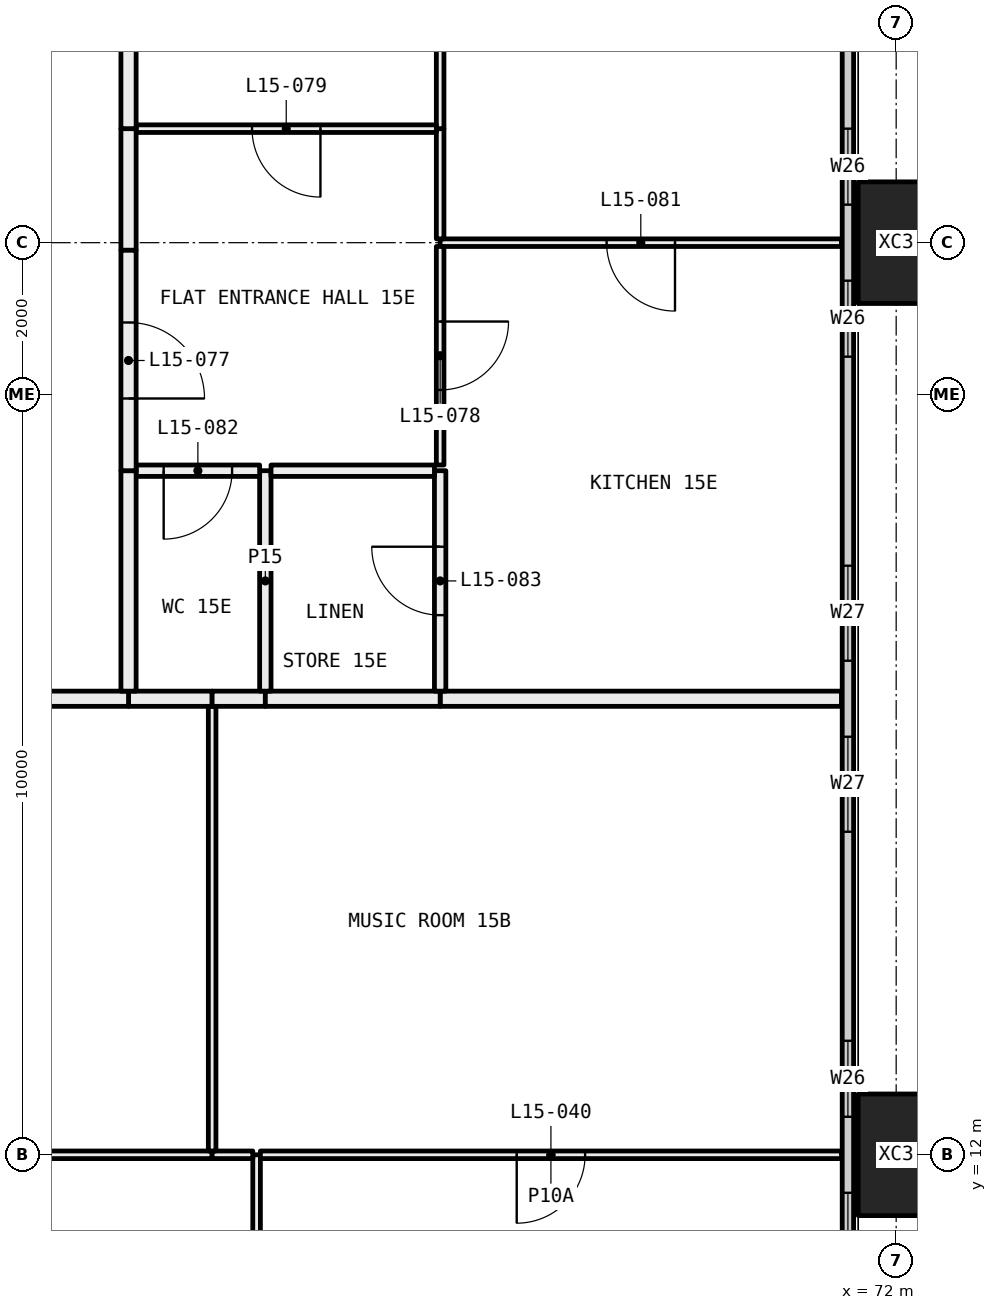
"""IFC4 building model, lengths in metres.
Left out: names, types, materials, properties, quantities, classifications, styles, units other than length and angle.
Written with IfcOpenShell. Run it as: python <this file> out.ifc"""

import sys

from ifc_helpers import new_model, si_unit, direction, frame, frame_2d, origin, origin_2d, place, context, subcontext, project, spatial, rectangle, hollow_rectangle, extrude, element, fill, save


model = new_model("IFC4")
c1 = context("Model", 3, precision=1e-05, world=origin(), true_north=direction((0.0, 1.0)))
c2 = subcontext(c1, "Body", "Model", "MODEL_VIEW")
j1 = project(units=[si_unit("LENGTHUNIT", "METRE"), si_unit("PLANEANGLEUNIT", "RADIAN")], contexts=[c1])
p1 = place(None, origin())
s1 = spatial("IfcSite", under=j1, at=p1, CompositionType="ELEMENT")
p2 = place(p1, origin())
s2 = spatial("IfcBuilding", under=s1, at=p2, CompositionType="ELEMENT")
p3 = place(p2, frame((0.0, 0.0, 64.5)))
s3 = spatial("IfcBuildingStorey", under=s2, at=p3, CompositionType="ELEMENT", Elevation=64.5)
for number, where, z_axis, x_axis in (
    (1, (72.0, 12.0, -0.4), (0.0, 0.0, 1.0), (0.0, 1.0, 0.0)),
    (2, (72.0, 24.0, -0.4), (0.0, 0.0, 1.0), (0.0, 1.0, 0.0)),
):
    element("IfcColumn", number, at=place(p3, frame(where, z_axis=z_axis, x_axis=x_axis)), inside=s3, PredefinedType="COLUMN", context=c2, shape_type="SweptSolid", body=[
        extrude(hollow_rectangle(XDim=1.6, YDim=1.0, WallThickness=0.065, at=origin_2d()), origin(), (0.0, 0.0, 1.0), 3.45),
    ])
p4 = place(p3, frame((71.365, 6.71, 0.0), z_axis=(0.0, 0.0, 1.0), x_axis=(0.0, 1.0, 0.0)))
e3 = element("IfcWall", 3, at=p4, inside=s3, PredefinedType="ELEMENTEDWALL", context=c2, shape_type="SweptSolid", body=[
    extrude(rectangle(XDim=34.58, YDim=0.15, at=frame_2d((17.29, 0.0))), origin(), (0.0, 0.0, 1.0), 3.05),
])
p5 = place(p4, frame((0.29, 0.0, 0.45)))
e4 = element("IfcOpeningElement", 4, at=p5, cuts=e3, PredefinedType="OPENING", context=c2, shape_type="SweptSolid", body=[
    extrude(rectangle(XDim=4.5, YDim=2.55, at=frame_2d((2.25, 1.275))), frame((0.0, 0.085, 0.0), z_axis=(0.0, -1.0, 0.0), x_axis=(1.0, 0.0, 0.0)), (0.0, 0.0, 1.0), 0.17),
])
p6 = place(p4, frame((5.79, 0.0, 0.45)))
e5 = element("IfcOpeningElement", 5, at=p6, cuts=e3, PredefinedType="OPENING", context=c2, shape_type="SweptSolid", body=[
    extrude(rectangle(XDim=1.0, YDim=2.55, at=frame_2d((0.5, 1.275))), frame((0.0, 0.085, 0.0), z_axis=(0.0, -1.0, 0.0), x_axis=(1.0, 0.0, 0.0)), (0.0, 0.0, 1.0), 0.17),
])
p7 = place(p4, frame((9.54, 0.0, 0.45)))
e6 = element("IfcOpeningElement", 6, at=p7, cuts=e3, PredefinedType="OPENING", context=c2, shape_type="SweptSolid", body=[
    extrude(rectangle(XDim=1.25, YDim=2.55, at=frame_2d((0.625, 1.275))), frame((0.0, 0.085, 0.0), z_axis=(0.0, -1.0, 0.0), x_axis=(1.0, 0.0, 0.0)), (0.0, 0.0, 1.0), 0.17),
])
p8 = place(p4, frame((11.79, 0.0, 0.45)))
e7 = element("IfcOpeningElement", 7, at=p8, cuts=e3, PredefinedType="OPENING", context=c2, shape_type="SweptSolid", body=[
    extrude(rectangle(XDim=1.25, YDim=2.55, at=frame_2d((0.625, 1.275))), frame((0.0, 0.085, 0.0), z_axis=(0.0, -1.0, 0.0), x_axis=(1.0, 0.0, 0.0)), (0.0, 0.0, 1.0), 0.17),
])
p9 = place(p4, frame((15.79, 0.0, 0.45)))
e8 = element("IfcOpeningElement", 8, at=p9, cuts=e3, PredefinedType="OPENING", context=c2, shape_type="SweptSolid", body=[
    extrude(rectangle(XDim=1.0, YDim=2.55, at=frame_2d((0.5, 1.275))), frame((0.0, 0.085, 0.0), z_axis=(0.0, -1.0, 0.0), x_axis=(1.0, 0.0, 0.0)), (0.0, 0.0, 1.0), 0.17),
])
p10 = place(p4, frame((17.79, 0.0, 0.45)))
e9 = element("IfcOpeningElement", 9, at=p10, cuts=e3, PredefinedType="OPENING", context=c2, shape_type="SweptSolid", body=[
    extrude(rectangle(XDim=1.0, YDim=2.55, at=frame_2d((0.5, 1.275))), frame((0.0, 0.085, 0.0), z_axis=(0.0, -1.0, 0.0), x_axis=(1.0, 0.0, 0.0)), (0.0, 0.0, 1.0), 0.17),
])
p11 = place(p4, frame((21.54, 0.0, 0.45)))
e10 = element("IfcOpeningElement", 10, at=p11, cuts=e3, PredefinedType="OPENING", context=c2, shape_type="SweptSolid", body=[
    extrude(rectangle(XDim=1.25, YDim=2.55, at=frame_2d((0.625, 1.275))), frame((0.0, 0.085, 0.0), z_axis=(0.0, -1.0, 0.0), x_axis=(1.0, 0.0, 0.0)), (0.0, 0.0, 1.0), 0.17),
])
p12 = place(p4, frame((23.79, 0.0, 0.45)))
e11 = element("IfcOpeningElement", 11, at=p12, cuts=e3, PredefinedType="OPENING", context=c2, shape_type="SweptSolid", body=[
    extrude(rectangle(XDim=1.25, YDim=2.55, at=frame_2d((0.625, 1.275))), frame((0.0, 0.085, 0.0), z_axis=(0.0, -1.0, 0.0), x_axis=(1.0, 0.0, 0.0)), (0.0, 0.0, 1.0), 0.17),
])
p13 = place(p4, frame((27.79, 0.0, 0.45)))
e12 = element("IfcOpeningElement", 12, at=p13, cuts=e3, PredefinedType="OPENING", context=c2, shape_type="SweptSolid", body=[
    extrude(rectangle(XDim=1.0, YDim=2.55, at=frame_2d((0.5, 1.275))), frame((0.0, 0.085, 0.0), z_axis=(0.0, -1.0, 0.0), x_axis=(1.0, 0.0, 0.0)), (0.0, 0.0, 1.0), 0.17),
])
p14 = place(p4, frame((29.79, 0.0, 0.45)))
e13 = element("IfcOpeningElement", 13, at=p14, cuts=e3, PredefinedType="OPENING", context=c2, shape_type="SweptSolid", body=[
    extrude(rectangle(XDim=4.5, YDim=2.55, at=frame_2d((2.25, 1.275))), frame((0.0, 0.085, 0.0), z_axis=(0.0, -1.0, 0.0), x_axis=(1.0, 0.0, 0.0)), (0.0, 0.0, 1.0), 0.17),
])
p15 = place(p3, frame((63.585, 6.05, 0.0), z_axis=(0.0, 0.0, 1.0), x_axis=(0.0, 1.0, 0.0)))
e14 = element("IfcWall", 14, at=p15, inside=s3, PredefinedType="PARTITIONING", context=c2, shape_type="SweptSolid", body=[
    extrude(rectangle(XDim=5.95, YDim=0.1, at=frame_2d((2.975, 0.0))), origin(), (0.0, 0.0, 1.0), 2.45),
])
p16 = place(p15, frame((2.525, 0.0, 0.0)))
e15 = element("IfcOpeningElement", 15, at=p16, cuts=e14, PredefinedType="OPENING", context=c2, shape_type="SweptSolid", body=[
    extrude(rectangle(XDim=0.9, YDim=2.1, at=frame_2d((0.45, 1.05))), frame((0.0, 0.06, 0.0), z_axis=(0.0, -1.0, 0.0), x_axis=(1.0, 0.0, 0.0)), (0.0, 0.0, 1.0), 0.12),
])
p17 = place(p3, frame((63.0, 12.0, 0.0), z_axis=(0.0, 0.0, 1.0), x_axis=(-1.0, 0.0, 0.0)))
e16 = element("IfcWall", 16, at=p17, inside=s3, PredefinedType="PARTITIONING", context=c2, shape_type="SweptSolid", body=[
    extrude(rectangle(XDim=2.2, YDim=0.1, at=frame_2d((1.1, 0.0))), origin(), (0.0, 0.0, 1.0), 2.45),
])
p18 = place(p3, frame((63.535, 12.0, 0.0), z_axis=(0.0, 0.0, 1.0), x_axis=(-1.0, 0.0, 0.0)))
e17 = element("IfcWall", 17, at=p18, inside=s3, PredefinedType="PARTITIONING", context=c2, shape_type="SweptSolid", body=[
    extrude(rectangle(XDim=0.535, YDim=0.1, at=frame_2d((0.268, 0.0))), origin(), (0.0, 0.0, 1.0), 2.45),
])
p19 = place(p3, frame((71.28, 12.0, 0.0), z_axis=(0.0, 0.0, 1.0), x_axis=(-1.0, 0.0, 0.0)))
e18 = element("IfcWall", 18, at=p19, inside=s3, PredefinedType="PARTITIONING", context=c2, shape_type="SweptSolid", body=[
    extrude(rectangle(XDim=7.645, YDim=0.1, at=frame_2d((3.823, 0.0))), origin(), (0.0, 0.0, 1.0), 2.45),
])
p20 = place(p19, frame((3.373, 0.0, 0.0)))
e19 = element("IfcOpeningElement", 19, at=p20, cuts=e18, PredefinedType="OPENING", context=c2, shape_type="SweptSolid", body=[
    extrude(rectangle(XDim=0.9, YDim=2.1, at=frame_2d((0.45, 1.05))), frame((0.0, 0.06, 0.0), z_axis=(0.0, -1.0, 0.0), x_axis=(1.0, 0.0, 0.0)), (0.0, 0.0, 1.0), 0.12),
])
p21 = place(p3, frame((63.0, 12.05, 0.0), z_axis=(0.0, 0.0, 1.0), x_axis=(0.0, 1.0, 0.0)))
e20 = element("IfcWall", 20, at=p21, inside=s3, PredefinedType="PARTITIONING", context=c2, shape_type="SweptSolid", body=[
    extrude(rectangle(XDim=5.85, YDim=0.1, at=frame_2d((2.925, 0.0))), origin(), (0.0, 0.0, 1.0), 2.45),
])
p22 = place(p3, frame((63.0, 18.0, 0.0), z_axis=(0.0, 0.0, 1.0), x_axis=(-1.0, 0.0, 0.0)))
e21 = element("IfcWall", 21, at=p22, inside=s3, PredefinedType="PARTITIONING", context=c2, shape_type="SweptSolid", body=[
    extrude(rectangle(XDim=1.1, YDim=0.2, at=frame_2d((0.55, 0.0))), origin(), (0.0, 0.0, 1.0), 3.05),
])
p23 = place(p3, frame((61.9, 18.0, 0.0), z_axis=(0.0, 0.0, 1.0), x_axis=(-1.0, 0.0, 0.0)))
e22 = element("IfcWall", 22, at=p23, inside=s3, PredefinedType="PARTITIONING", context=c2, shape_type="SweptSolid", body=[
    extrude(rectangle(XDim=7.9, YDim=0.2, at=frame_2d((3.95, 0.0))), origin(), (0.0, 0.0, 1.0), 3.05),
])
p24 = place(p3, frame((71.28, 18.0, 0.0), z_axis=(0.0, 0.0, 1.0), x_axis=(-1.0, 0.0, 0.0)))
e23 = element("IfcWall", 23, at=p24, inside=s3, PredefinedType="PARTITIONING", context=c2, shape_type="SweptSolid", body=[
    extrude(rectangle(XDim=5.28, YDim=0.2, at=frame_2d((2.64, 0.0))), origin(), (0.0, 0.0, 1.0), 3.05),
])
p25 = place(p3, frame((63.7, 18.0, 0.0), z_axis=(0.0, 0.0, 1.0), x_axis=(-1.0, 0.0, 0.0)))
e24 = element("IfcWall", 24, at=p25, inside=s3, PredefinedType="PARTITIONING", context=c2, shape_type="SweptSolid", body=[
    extrude(rectangle(XDim=0.7, YDim=0.2, at=frame_2d((0.35, 0.0))), origin(), (0.0, 0.0, 1.0), 3.05),
])
p26 = place(p3, frame((66.0, 18.0, 0.0), z_axis=(0.0, 0.0, 1.0), x_axis=(-1.0, 0.0, 0.0)))
e25 = element("IfcWall", 25, at=p26, inside=s3, PredefinedType="PARTITIONING", context=c2, shape_type="SweptSolid", body=[
    extrude(rectangle(XDim=2.3, YDim=0.2, at=frame_2d((1.15, 0.0))), origin(), (0.0, 0.0, 1.0), 3.05),
])
p27 = place(p3, frame((71.28, 24.0, 0.0), z_axis=(0.0, 0.0, 1.0), x_axis=(-1.0, 0.0, 0.0)))
e26 = element("IfcWall", 26, at=p27, inside=s3, PredefinedType="PARTITIONING", context=c2, shape_type="SweptSolid", body=[
    extrude(rectangle(XDim=5.28, YDim=0.1, at=frame_2d((2.64, 0.0))), origin(), (0.0, 0.0, 1.0), 2.45),
])
p28 = place(p27, frame((2.19, 0.0, 0.0)))
e27 = element("IfcOpeningElement", 27, at=p28, cuts=e26, PredefinedType="OPENING", context=c2, shape_type="SweptSolid", body=[
    extrude(rectangle(XDim=0.9, YDim=2.1, at=frame_2d((0.45, 1.05))), frame((0.0, 0.06, 0.0), z_axis=(0.0, -1.0, 0.0), x_axis=(1.0, 0.0, 0.0)), (0.0, 0.0, 1.0), 0.12),
])
p29 = place(p3, frame((66.0, 21.0, 0.0), z_axis=(0.0, 0.0, 1.0), x_axis=(0.0, -1.0, 0.0)))
e28 = element("IfcWall", 28, at=p29, inside=s3, PredefinedType="PARTITIONING", context=c2, shape_type="SweptSolid", body=[
    extrude(rectangle(XDim=2.9, YDim=0.15, at=frame_2d((1.45, 0.0))), origin(), (0.0, 0.0, 1.0), 3.05),
])
p30 = place(p29, frame((1.0, 0.0, 0.0)))
e29 = element("IfcOpeningElement", 29, at=p30, cuts=e28, PredefinedType="OPENING", context=c2, shape_type="SweptSolid", body=[
    extrude(rectangle(XDim=0.9, YDim=2.1, at=frame_2d((0.45, 1.05))), frame((0.0, 0.085, 0.0), z_axis=(0.0, -1.0, 0.0), x_axis=(1.0, 0.0, 0.0)), (0.0, 0.0, 1.0), 0.17),
])
p31 = place(p3, frame((66.0, 23.95, 0.0), z_axis=(0.0, 0.0, 1.0), x_axis=(0.0, -1.0, 0.0)))
e30 = element("IfcWall", 30, at=p31, inside=s3, PredefinedType="PARTITIONING", context=c2, shape_type="SweptSolid", body=[
    extrude(rectangle(XDim=2.875, YDim=0.1, at=frame_2d((1.438, 0.0))), origin(), (0.0, 0.0, 1.0), 2.45),
])
p32 = place(p31, frame((0.988, 0.0, 0.0)))
e31 = element("IfcOpeningElement", 31, at=p32, cuts=e30, PredefinedType="OPENING", context=c2, shape_type="SweptSolid", body=[
    extrude(rectangle(XDim=0.9, YDim=2.1, at=frame_2d((0.45, 1.05))), frame((0.0, 0.06, 0.0), z_axis=(0.0, -1.0, 0.0), x_axis=(1.0, 0.0, 0.0)), (0.0, 0.0, 1.0), 0.12),
])
p33 = place(p3, frame((66.0, 25.5, 0.0), z_axis=(0.0, 0.0, 1.0), x_axis=(0.0, -1.0, 0.0)))
e32 = element("IfcWall", 32, at=p33, inside=s3, PredefinedType="PARTITIONING", context=c2, shape_type="SweptSolid", body=[
    extrude(rectangle(XDim=1.45, YDim=0.1, at=frame_2d((0.725, 0.0))), origin(), (0.0, 0.0, 1.0), 2.45),
])
p34 = place(p3, frame((66.0, 29.95, 0.0), z_axis=(0.0, 0.0, 1.0), x_axis=(0.0, -1.0, 0.0)))
e33 = element("IfcWall", 33, at=p34, inside=s3, PredefinedType="PARTITIONING", context=c2, shape_type="SweptSolid", body=[
    extrude(rectangle(XDim=4.45, YDim=0.1, at=frame_2d((2.225, 0.0))), origin(), (0.0, 0.0, 1.0), 3.05),
])
p35 = place(p3, frame((63.7, 18.1, 0.0), z_axis=(0.0, 0.0, 1.0), x_axis=(0.0, 1.0, 0.0)))
e34 = element("IfcWall", 34, at=p35, inside=s3, PredefinedType="PARTITIONING", context=c2, shape_type="SweptSolid", body=[
    extrude(rectangle(XDim=2.9, YDim=0.15, at=frame_2d((1.45, 0.0))), origin(), (0.0, 0.0, 1.0), 3.05),
])
p36 = place(p3, frame((63.625, 21.0, 0.0), z_axis=(0.0, 0.0, 1.0), x_axis=(-1.0, 0.0, 0.0)))
e35 = element("IfcWall", 35, at=p36, inside=s3, PredefinedType="PARTITIONING", context=c2, shape_type="SweptSolid", body=[
    extrude(rectangle(XDim=1.625, YDim=0.15, at=frame_2d((0.812, 0.0))), origin(), (0.0, 0.0, 1.0), 3.05),
])
p37 = place(p36, frame((0.363, 0.0, 0.0)))
e36 = element("IfcOpeningElement", 36, at=p37, cuts=e35, PredefinedType="OPENING", context=c2, shape_type="SweptSolid", body=[
    extrude(rectangle(XDim=0.9, YDim=2.1, at=frame_2d((0.45, 1.05))), frame((0.0, 0.085, 0.0), z_axis=(0.0, -1.0, 0.0), x_axis=(1.0, 0.0, 0.0)), (0.0, 0.0, 1.0), 0.17),
])
p38 = place(p3, frame((61.9, 21.0, 0.0), z_axis=(0.0, 0.0, 1.0), x_axis=(0.0, -1.0, 0.0)))
e37 = element("IfcWall", 37, at=p38, inside=s3, PredefinedType="PARTITIONING", context=c2, shape_type="SweptSolid", body=[
    extrude(rectangle(XDim=2.9, YDim=0.2, at=frame_2d((1.45, 0.0))), origin(), (0.0, 0.0, 1.0), 3.05),
])
p39 = place(p3, frame((65.925, 21.0, 0.0), z_axis=(0.0, 0.0, 1.0), x_axis=(-1.0, 0.0, 0.0)))
e38 = element("IfcWall", 38, at=p39, inside=s3, PredefinedType="PARTITIONING", context=c2, shape_type="SweptSolid", body=[
    extrude(rectangle(XDim=2.15, YDim=0.15, at=frame_2d((1.075, 0.0))), origin(), (0.0, 0.0, 1.0), 3.05),
])
p40 = place(p3, frame((65.95, 25.5, 0.0), z_axis=(0.0, 0.0, 1.0), x_axis=(-1.0, 0.0, 0.0)))
e39 = element("IfcWall", 39, at=p40, inside=s3, PredefinedType="PARTITIONING", context=c2, shape_type="SweptSolid", body=[
    extrude(rectangle(XDim=3.95, YDim=0.1, at=frame_2d((1.975, 0.0))), origin(), (0.0, 0.0, 1.0), 3.05),
])
p41 = place(p40, frame((1.525, 0.0, 0.0)))
e40 = element("IfcOpeningElement", 40, at=p41, cuts=e39, PredefinedType="OPENING", context=c2, shape_type="SweptSolid", body=[
    extrude(rectangle(XDim=0.9, YDim=2.1, at=frame_2d((0.45, 1.05))), frame((0.0, 0.06, 0.0), z_axis=(0.0, -1.0, 0.0), x_axis=(1.0, 0.0, 0.0)), (0.0, 0.0, 1.0), 0.12),
])
p42 = place(p3, frame((61.9, 25.5, 0.0), z_axis=(0.0, 0.0, 1.0), x_axis=(0.0, -1.0, 0.0)))
e41 = element("IfcWall", 41, at=p42, inside=s3, PredefinedType="PARTITIONING", context=c2, shape_type="SweptSolid", body=[
    extrude(rectangle(XDim=1.6, YDim=0.2, at=frame_2d((0.8, 0.0))), origin(), (0.0, 0.0, 1.0), 2.45),
])
p43 = place(p3, frame((61.9, 23.9, 0.0), z_axis=(0.0, 0.0, 1.0), x_axis=(0.0, -1.0, 0.0)))
e42 = element("IfcWall", 42, at=p43, inside=s3, PredefinedType="PARTITIONING", context=c2, shape_type="SweptSolid", body=[
    extrude(rectangle(XDim=2.9, YDim=0.2, at=frame_2d((1.45, 0.0))), origin(), (0.0, 0.0, 1.0), 3.05),
])
p44 = place(p43, frame((0.95, 0.0, 0.0)))
e43 = element("IfcOpeningElement", 43, at=p44, cuts=e42, PredefinedType="OPENING", context=c2, shape_type="SweptSolid", body=[
    extrude(rectangle(XDim=1.0, YDim=2.1, at=frame_2d((0.5, 1.05))), frame((0.0, 0.11, 0.0), z_axis=(0.0, -1.0, 0.0), x_axis=(1.0, 0.0, 0.0)), (0.0, 0.0, 1.0), 0.22),
])
p45 = place(p3, frame((61.9, 35.9, 0.0), z_axis=(0.0, 0.0, 1.0), x_axis=(0.0, -1.0, 0.0)))
e44 = element("IfcWall", 44, at=p45, inside=s3, PredefinedType="PARTITIONING", context=c2, shape_type="SweptSolid", body=[
    extrude(rectangle(XDim=10.4, YDim=0.2, at=frame_2d((5.2, 0.0))), origin(), (0.0, 0.0, 1.0), 3.05),
])
p46 = place(p5, origin())
e45 = element("IfcWindow", 45, at=p46, inside=s3, PartitioningType="SINGLE_PANEL", PredefinedType="WINDOW", context=c2, shape_type="SweptSolid", body=[
    extrude(rectangle(XDim=4.5, YDim=2.55, at=frame_2d((2.25, 1.275))), frame((0.0, 0.03, 0.0), z_axis=(0.0, -1.0, 0.0), x_axis=(1.0, 0.0, 0.0)), (0.0, 0.0, 1.0), 0.06),
])
fill(e4, e45)
p47 = place(p6, origin())
e46 = element("IfcWindow", 46, at=p47, inside=s3, PartitioningType="SINGLE_PANEL", PredefinedType="WINDOW", context=c2, shape_type="SweptSolid", body=[
    extrude(rectangle(XDim=1.0, YDim=2.55, at=frame_2d((0.5, 1.275))), frame((0.0, 0.03, 0.0), z_axis=(0.0, -1.0, 0.0), x_axis=(1.0, 0.0, 0.0)), (0.0, 0.0, 1.0), 0.06),
])
fill(e5, e46)
p48 = place(p7, origin())
e47 = element("IfcWindow", 47, at=p48, inside=s3, PartitioningType="SINGLE_PANEL", PredefinedType="WINDOW", context=c2, shape_type="SweptSolid", body=[
    extrude(rectangle(XDim=1.25, YDim=2.55, at=frame_2d((0.625, 1.275))), frame((0.0, 0.03, 0.0), z_axis=(0.0, -1.0, 0.0), x_axis=(1.0, 0.0, 0.0)), (0.0, 0.0, 1.0), 0.06),
])
fill(e6, e47)
p49 = place(p8, origin())
e48 = element("IfcWindow", 48, at=p49, inside=s3, PartitioningType="SINGLE_PANEL", PredefinedType="WINDOW", context=c2, shape_type="SweptSolid", body=[
    extrude(rectangle(XDim=1.25, YDim=2.55, at=frame_2d((0.625, 1.275))), frame((0.0, 0.03, 0.0), z_axis=(0.0, -1.0, 0.0), x_axis=(1.0, 0.0, 0.0)), (0.0, 0.0, 1.0), 0.06),
])
fill(e7, e48)
p50 = place(p9, origin())
e49 = element("IfcWindow", 49, at=p50, inside=s3, PartitioningType="SINGLE_PANEL", PredefinedType="WINDOW", context=c2, shape_type="SweptSolid", body=[
    extrude(rectangle(XDim=1.0, YDim=2.55, at=frame_2d((0.5, 1.275))), frame((0.0, 0.03, 0.0), z_axis=(0.0, -1.0, 0.0), x_axis=(1.0, 0.0, 0.0)), (0.0, 0.0, 1.0), 0.06),
])
fill(e8, e49)
p51 = place(p10, origin())
e50 = element("IfcWindow", 50, at=p51, inside=s3, PartitioningType="SINGLE_PANEL", PredefinedType="WINDOW", context=c2, shape_type="SweptSolid", body=[
    extrude(rectangle(XDim=1.0, YDim=2.55, at=frame_2d((0.5, 1.275))), frame((0.0, 0.03, 0.0), z_axis=(0.0, -1.0, 0.0), x_axis=(1.0, 0.0, 0.0)), (0.0, 0.0, 1.0), 0.06),
])
fill(e9, e50)
p52 = place(p20, origin())
e51 = element("IfcDoor", 51, at=p52, inside=s3, OperationType="SINGLE_SWING_LEFT", PredefinedType="DOOR", context=c2, shape_type="SweptSolid", body=[
    extrude(rectangle(XDim=0.9, YDim=2.1, at=frame_2d((0.45, 1.05))), frame((0.0, 0.025, 0.0), z_axis=(0.0, -1.0, 0.0), x_axis=(1.0, 0.0, 0.0)), (0.0, 0.0, 1.0), 0.05),
])
fill(e19, e51)
p53 = place(p44, origin())
e52 = element("IfcDoor", 52, at=p53, inside=s3, OperationType="SINGLE_SWING_LEFT", PredefinedType="DOOR", context=c2, shape_type="SweptSolid", body=[
    extrude(rectangle(XDim=1.0, YDim=2.1, at=frame_2d((0.5, 1.05))), frame((0.0, 0.025, 0.0), z_axis=(0.0, -1.0, 0.0), x_axis=(1.0, 0.0, 0.0)), (0.0, 0.0, 1.0), 0.05),
])
fill(e43, e52)
p54 = place(p32, origin())
e53 = element("IfcDoor", 53, at=p54, inside=s3, OperationType="SINGLE_SWING_RIGHT", PredefinedType="DOOR", context=c2, shape_type="SweptSolid", body=[
    extrude(rectangle(XDim=0.9, YDim=2.1, at=frame_2d((0.45, 1.05))), frame((0.0, 0.025, 0.0), z_axis=(0.0, -1.0, 0.0), x_axis=(1.0, 0.0, 0.0)), (0.0, 0.0, 1.0), 0.05),
])
fill(e31, e53)
p55 = place(p41, origin())
e54 = element("IfcDoor", 54, at=p55, inside=s3, OperationType="SINGLE_SWING_RIGHT", PredefinedType="DOOR", context=c2, shape_type="SweptSolid", body=[
    extrude(rectangle(XDim=0.9, YDim=2.1, at=frame_2d((0.45, 1.05))), frame((0.0, 0.025, 0.0), z_axis=(0.0, -1.0, 0.0), x_axis=(1.0, 0.0, 0.0)), (0.0, 0.0, 1.0), 0.05),
])
fill(e40, e54)
p56 = place(p28, origin())
e55 = element("IfcDoor", 55, at=p56, inside=s3, OperationType="SINGLE_SWING_RIGHT", PredefinedType="DOOR", context=c2, shape_type="SweptSolid", body=[
    extrude(rectangle(XDim=0.9, YDim=2.1, at=frame_2d((0.45, 1.05))), frame((0.0, 0.025, 0.0), z_axis=(0.0, -1.0, 0.0), x_axis=(1.0, 0.0, 0.0)), (0.0, 0.0, 1.0), 0.05),
])
fill(e27, e55)
p57 = place(p37, origin())
e56 = element("IfcDoor", 56, at=p57, inside=s3, OperationType="SINGLE_SWING_LEFT", PredefinedType="DOOR", context=c2, shape_type="SweptSolid", body=[
    extrude(rectangle(XDim=0.9, YDim=2.1, at=frame_2d((0.45, 1.05))), frame((0.0, 0.025, 0.0), z_axis=(0.0, -1.0, 0.0), x_axis=(1.0, 0.0, 0.0)), (0.0, 0.0, 1.0), 0.05),
])
fill(e36, e56)
p58 = place(p30, frame((0.9, 0.0, 0.0), x_axis=(-1.0, 0.0, 0.0)))
e57 = element("IfcDoor", 57, at=p58, inside=s3, OperationType="SINGLE_SWING_LEFT", PredefinedType="DOOR", context=c2, shape_type="SweptSolid", body=[
    extrude(rectangle(XDim=0.9, YDim=2.1, at=frame_2d((0.45, 1.05))), frame((0.0, 0.025, 0.0), z_axis=(0.0, -1.0, 0.0), x_axis=(1.0, 0.0, 0.0)), (0.0, 0.0, 1.0), 0.05),
])
fill(e29, e57)
save(model, sys.argv[1])
